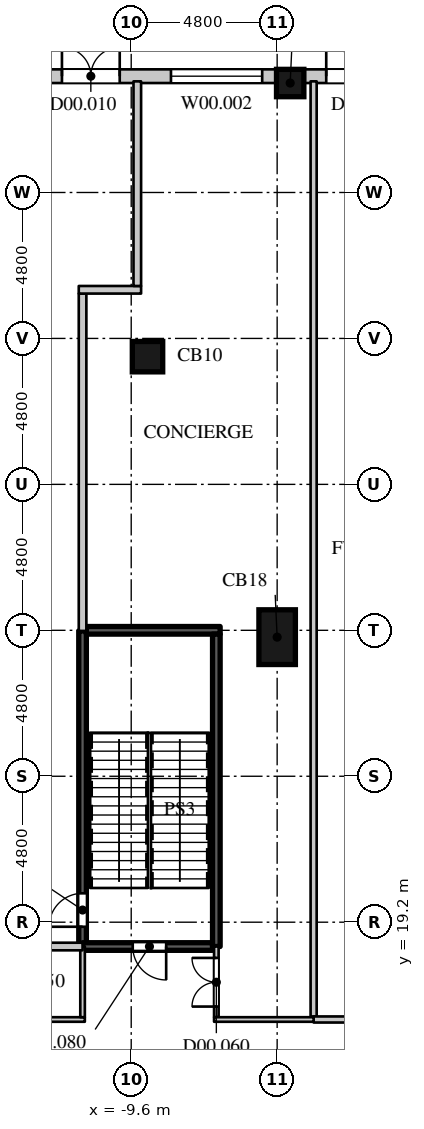
"""IFC4 building model, lengths in metres.
Left out: names, types, materials, properties, quantities, classifications, styles, units other than length and angle.
Written with IfcOpenShell. Run it as: python <this file> out.ifc"""

import sys

from ifc_helpers import new_model, si_unit, direction, frame, frame_2d, origin, origin_2d, place, context, subcontext, project, spatial, rectangle, extrude, element, fill, save


model = new_model("IFC4")
c1 = context("Model", 3, precision=1e-05, world=origin(), true_north=direction((0.0, 1.0)))
c2 = subcontext(c1, "Body", "Model", "MODEL_VIEW")
j1 = project(units=[si_unit("LENGTHUNIT", "METRE"), si_unit("PLANEANGLEUNIT", "RADIAN")], contexts=[c1])
p1 = place(None, origin())
s1 = spatial("IfcSite", under=j1, at=p1, CompositionType="ELEMENT")
p2 = place(p1, origin())
s2 = spatial("IfcBuilding", under=s1, at=p2, CompositionType="ELEMENT")
p3 = place(p2, origin())
s3 = spatial("IfcBuildingStorey", under=s2, at=p3, CompositionType="ELEMENT", Elevation=0.0)
p4 = place(p3, frame((-4.8, 28.575, 0.0), z_axis=(0.0, 0.0, 1.0), x_axis=(-1.0, 0.0, 0.0)))
e1 = element("IfcColumn", 1, at=p4, inside=s3, PredefinedType="COLUMN", context=c2, shape_type="SweptSolid", body=[
    extrude(rectangle(XDim=1.2, YDim=1.8, at=origin_2d()), origin(), (0.0, 0.0, 1.0), 6.0),
])
p5 = place(p3, frame((-9.064, 37.8, 0.0), z_axis=(0.0, 0.0, 1.0), x_axis=(1.0, 0.0, 0.0)))
e2 = element("IfcColumn", 2, at=p5, inside=s3, PredefinedType="COLUMN", context=c2, shape_type="SweptSolid", body=[
    extrude(rectangle(XDim=1.0, YDim=1.0, at=origin_2d()), origin(), (0.0, 0.0, 1.0), 6.0),
])
p6 = place(p3, frame((-4.371, 46.8, 0.0), z_axis=(0.0, 0.0, 1.0), x_axis=(1.0, 0.0, 0.0)))
e3 = element("IfcColumn", 3, at=p6, inside=s3, PredefinedType="COLUMN", context=c2, shape_type="SweptSolid", body=[
    extrude(rectangle(XDim=0.9, YDim=0.9, at=origin_2d()), origin(), (0.0, 0.0, 1.0), 6.0),
])
p7 = place(p3, frame((3.921, 47.025, 0.0), z_axis=(0.0, 0.0, 1.0), x_axis=(-1.0, 0.0, 0.0)))
e4 = element("IfcWall", 4, at=p7, inside=s3, PredefinedType="ELEMENTEDWALL", context=c2, shape_type="SweptSolid", body=[
    extrude(rectangle(XDim=7.842, YDim=0.45, at=frame_2d((3.921, 0.0))), origin(), (0.0, 0.0, 1.0), 4.8),
])
p8 = place(p7, frame((0.961, 0.0, 0.0)))
e5 = element("IfcOpeningElement", 5, at=p8, cuts=e4, PredefinedType="OPENING", context=c2, shape_type="SweptSolid", body=[
    extrude(rectangle(XDim=2.0, YDim=2.7, at=frame_2d((1.0, 1.35))), frame((0.0, 0.235, 0.0), z_axis=(0.0, -1.0, 0.0), x_axis=(1.0, 0.0, 0.0)), (0.0, 0.0, 1.0), 0.47),
])
p9 = place(p7, frame((5.107, 0.0, 0.0)))
e6 = element("IfcOpeningElement", 6, at=p9, cuts=e4, PredefinedType="OPENING", context=c2, shape_type="SweptSolid", body=[
    extrude(rectangle(XDim=2.0, YDim=2.7, at=frame_2d((1.0, 1.35))), frame((0.0, 0.235, 0.0), z_axis=(0.0, -1.0, 0.0), x_axis=(1.0, 0.0, 0.0)), (0.0, 0.0, 1.0), 0.47),
])
p10 = place(p3, frame((-4.821, 47.025, 0.0), z_axis=(0.0, 0.0, 1.0), x_axis=(-1.0, 0.0, 0.0)))
e7 = element("IfcWall", 7, at=p10, inside=s3, PredefinedType="ELEMENTEDWALL", context=c2, shape_type="SweptSolid", body=[
    extrude(rectangle(XDim=7.842, YDim=0.45, at=frame_2d((3.921, 0.0))), origin(), (0.0, 0.0, 1.0), 4.8),
])
p11 = place(p10, frame((0.471, 0.0, 1.05)))
e8 = element("IfcOpeningElement", 8, at=p11, cuts=e7, PredefinedType="OPENING", context=c2, shape_type="SweptSolid", body=[
    extrude(rectangle(XDim=3.0, YDim=2.7, at=frame_2d((1.5, 1.35))), frame((0.0, 0.235, 0.0), z_axis=(0.0, -1.0, 0.0), x_axis=(1.0, 0.0, 0.0)), (0.0, 0.0, 1.0), 0.47),
])
p12 = place(p10, frame((5.157, 0.0, 0.0)))
e9 = element("IfcOpeningElement", 9, at=p12, cuts=e7, PredefinedType="OPENING", context=c2, shape_type="SweptSolid", body=[
    extrude(rectangle(XDim=1.9, YDim=2.7, at=frame_2d((0.95, 1.35))), frame((0.0, 0.235, 0.0), z_axis=(0.0, -1.0, 0.0), x_axis=(1.0, 0.0, 0.0)), (0.0, 0.0, 1.0), 0.47),
])
p13 = place(p3, frame((-3.6, 16.1, 0.0), z_axis=(0.0, 0.0, 1.0), x_axis=(0.0, 1.0, 0.0)))
e10 = element("IfcWall", 10, at=p13, inside=s3, PredefinedType="PARTITIONING", context=c2, shape_type="SweptSolid", body=[
    extrude(rectangle(XDim=30.755, YDim=0.2, at=frame_2d((15.377, 0.0))), origin(), (0.0, 0.0, 1.0), 5.65),
])
p14 = place(p3, frame((-3.6, 16.0, 0.0), z_axis=(0.0, 0.0, 1.0), x_axis=(1.0, 0.0, 0.0)))
e11 = element("IfcWall", 11, at=p14, inside=s3, PredefinedType="PARTITIONING", context=c2, shape_type="SweptSolid", body=[
    extrude(rectangle(XDim=7.2, YDim=0.2, at=frame_2d((3.6, 0.0))), origin(), (0.0, 0.0, 1.0), 5.65),
])
p15 = place(p14, frame((2.85, 0.0, 0.0)))
e12 = element("IfcOpeningElement", 12, at=p15, cuts=e11, PredefinedType="OPENING", context=c2, shape_type="SweptSolid", body=[
    extrude(rectangle(XDim=1.5, YDim=2.2, at=frame_2d((0.75, 1.1))), frame((0.0, 0.11, 0.0), z_axis=(0.0, -1.0, 0.0), x_axis=(1.0, 0.0, 0.0)), (0.0, 0.0, 1.0), 0.22),
])
p16 = place(p3, frame((-20.075, 16.0, 0.0), z_axis=(0.0, 0.0, 1.0), x_axis=(1.0, 0.0, 0.0)))
e13 = element("IfcWall", 13, at=p16, inside=s3, PredefinedType="PARTITIONING", context=c2, shape_type="SweptSolid", body=[
    extrude(rectangle(XDim=8.95, YDim=0.15, at=frame_2d((4.475, 0.0))), origin(), (0.0, 0.0, 1.0), 5.65),
])
p17 = place(p16, frame((4.15, 0.0, 0.0)))
e14 = element("IfcOpeningElement", 14, at=p17, cuts=e13, PredefinedType="OPENING", context=c2, shape_type="SweptSolid", body=[
    extrude(rectangle(XDim=1.6, YDim=2.4, at=frame_2d((0.8, 1.2))), frame((0.0, 0.085, 0.0), z_axis=(0.0, -1.0, 0.0), x_axis=(1.0, 0.0, 0.0)), (0.0, 0.0, 1.0), 0.17),
])
p18 = place(p3, frame((-11.2, 16.075, 0.0), z_axis=(0.0, 0.0, 1.0), x_axis=(0.0, 1.0, 0.0)))
e15 = element("IfcWall", 15, at=p18, inside=s3, PredefinedType="PARTITIONING", context=c2, shape_type="SweptSolid", body=[
    extrude(rectangle(XDim=2.325, YDim=0.15, at=frame_2d((1.163, 0.0))), origin(), (0.0, 0.0, 1.0), 5.65),
])
p19 = place(p3, frame((-6.8, 16.075, 0.0), z_axis=(0.0, 0.0, 1.0), x_axis=(0.0, 1.0, 0.0)))
e16 = element("IfcWall", 16, at=p19, inside=s3, PredefinedType="PARTITIONING", context=c2, shape_type="SweptSolid", body=[
    extrude(rectangle(XDim=2.325, YDim=0.15, at=frame_2d((1.163, 0.0))), origin(), (0.0, 0.0, 1.0), 5.65),
])
p20 = place(p19, frame((0.35, 0.0, 0.0)))
e17 = element("IfcOpeningElement", 17, at=p20, cuts=e16, PredefinedType="OPENING", context=c2, shape_type="SweptSolid", body=[
    extrude(rectangle(XDim=1.6, YDim=2.4, at=frame_2d((0.8, 1.2))), frame((0.0, 0.085, 0.0), z_axis=(0.0, -1.0, 0.0), x_axis=(1.0, 0.0, 0.0)), (0.0, 0.0, 1.0), 0.17),
])
p21 = place(p3, frame((-6.875, 16.0, 0.0), z_axis=(0.0, 0.0, 1.0), x_axis=(1.0, 0.0, 0.0)))
e18 = element("IfcWall", 18, at=p21, inside=s3, PredefinedType="PARTITIONING", context=c2, shape_type="SweptSolid", body=[
    extrude(rectangle(XDim=3.275, YDim=0.15, at=frame_2d((1.637, 0.0))), origin(), (0.0, 0.0, 1.0), 5.65),
])
p22 = place(p3, frame((-11.2, 18.4, 0.0), z_axis=(0.0, 0.0, 1.0), x_axis=(0.0, 1.0, 0.0)))
e19 = element("IfcWall", 19, at=p22, inside=s3, PredefinedType="SHEAR", context=c2, shape_type="SweptSolid", body=[
    extrude(rectangle(XDim=10.38, YDim=0.25, at=frame_2d((5.19, 0.0))), origin(), (0.0, 0.0, 1.0), 5.65),
])
p23 = place(p22, frame((0.65, 0.0, 0.0)))
e20 = element("IfcOpeningElement", 20, at=p23, cuts=e19, PredefinedType="OPENING", context=c2, shape_type="SweptSolid", body=[
    extrude(rectangle(XDim=1.1, YDim=2.2, at=frame_2d((0.55, 1.1))), frame((0.0, 0.135, 0.0), z_axis=(0.0, -1.0, 0.0), x_axis=(1.0, 0.0, 0.0)), (0.0, 0.0, 1.0), 0.27),
])
p24 = place(p3, frame((-11.2, 18.4, 0.0), z_axis=(0.0, 0.0, 1.0), x_axis=(1.0, 0.0, 0.0)))
e21 = element("IfcWall", 21, at=p24, inside=s3, PredefinedType="SHEAR", context=c2, shape_type="SweptSolid", body=[
    extrude(rectangle(XDim=4.275, YDim=0.25, at=frame_2d((2.137, 0.0))), origin(), (0.0, 0.0, 1.0), 5.65),
])
p25 = place(p24, frame((1.65, 0.0, 0.0)))
e22 = element("IfcOpeningElement", 22, at=p25, cuts=e21, PredefinedType="OPENING", context=c2, shape_type="SweptSolid", body=[
    extrude(rectangle(XDim=1.1, YDim=2.2, at=frame_2d((0.55, 1.1))), frame((0.0, 0.135, 0.0), z_axis=(0.0, -1.0, 0.0), x_axis=(1.0, 0.0, 0.0)), (0.0, 0.0, 1.0), 0.27),
])
p26 = place(p3, frame((-11.075, 28.8, 0.0), z_axis=(0.0, 0.0, 1.0), x_axis=(1.0, 0.0, 0.0)))
e23 = element("IfcWall", 23, at=p26, inside=s3, PredefinedType="SHEAR", context=c2, shape_type="SweptSolid", body=[
    extrude(rectangle(XDim=4.4, YDim=0.25, at=frame_2d((2.2, 0.0))), origin(), (0.0, 0.0, 1.0), 5.65),
])
p27 = place(p3, frame((-6.8, 18.4, 0.0), z_axis=(0.0, 0.0, 1.0), x_axis=(0.0, 1.0, 0.0)))
e24 = element("IfcWall", 24, at=p27, inside=s3, PredefinedType="SHEAR", context=c2, shape_type="SweptSolid", body=[
    extrude(rectangle(XDim=10.275, YDim=0.25, at=frame_2d((5.138, 0.0))), origin(), (0.0, 0.0, 1.0), 5.65),
])
p28 = place(p3, frame((-13.225, 18.4, 0.0), z_axis=(0.0, 0.0, 1.0), x_axis=(1.0, 0.0, 0.0)))
e25 = element("IfcWall", 25, at=p28, inside=s3, PredefinedType="PARTITIONING", context=c2, shape_type="SweptSolid", body=[
    extrude(rectangle(XDim=2.025, YDim=0.25, at=frame_2d((1.013, 0.0))), origin(), (0.0, 0.0, 1.0), 5.65),
])
p29 = place(p3, frame((-11.2, 28.78, 0.0), z_axis=(0.0, 0.0, 1.0), x_axis=(0.0, 1.0, 0.0)))
e26 = element("IfcWall", 26, at=p29, inside=s3, PredefinedType="PARTITIONING", context=c2, shape_type="SweptSolid", body=[
    extrude(rectangle(XDim=11.095, YDim=0.25, at=frame_2d((5.547, 0.0))), origin(), (0.0, 0.0, 1.0), 5.65),
])
p30 = place(p3, frame((-11.325, 40.0, 0.0), z_axis=(0.0, 0.0, 1.0), x_axis=(1.0, 0.0, 0.0)))
e27 = element("IfcWall", 27, at=p30, inside=s3, PredefinedType="PARTITIONING", context=c2, shape_type="SweptSolid", body=[
    extrude(rectangle(XDim=2.05, YDim=0.25, at=frame_2d((1.025, 0.0))), origin(), (0.0, 0.0, 1.0), 5.65),
])
p31 = place(p3, frame((-9.4, 40.125, 0.0), z_axis=(0.0, 0.0, 1.0), x_axis=(0.0, 1.0, 0.0)))
e28 = element("IfcWall", 28, at=p31, inside=s3, PredefinedType="PARTITIONING", context=c2, shape_type="SweptSolid", body=[
    extrude(rectangle(XDim=6.73, YDim=0.25, at=frame_2d((3.365, 0.0))), origin(), (0.0, 0.0, 1.0), 5.65),
])
p32 = place(p9, frame((2.0, 0.0, 0.0), z_axis=(0.0, 0.0, 1.0), x_axis=(-1.0, 0.0, 0.0)))
e29 = element("IfcDoor", 29, at=p32, inside=s3, OperationType="DOUBLE_DOOR_SINGLE_SWING", PredefinedType="DOOR", context=c2, shape_type="SweptSolid", body=[
    extrude(rectangle(XDim=2.0, YDim=2.7, at=frame_2d((1.0, 1.35))), frame((0.0, -0.08, 0.0), z_axis=(0.0, -1.0, 0.0), x_axis=(1.0, 0.0, 0.0)), (0.0, 0.0, 1.0), 0.05),
])
fill(e6, e29)
p33 = place(p11, origin())
e30 = element("IfcWindow", 30, at=p33, inside=s3, PartitioningType="SINGLE_PANEL", PredefinedType="WINDOW", context=c2, shape_type="SweptSolid", body=[
    extrude(rectangle(XDim=3.0, YDim=2.7, at=frame_2d((1.5, 1.35))), frame((0.0, 0.135, 0.0), z_axis=(0.0, -1.0, 0.0), x_axis=(1.0, 0.0, 0.0)), (0.0, 0.0, 1.0), 0.06),
])
fill(e8, e30)
p34 = place(p12, frame((1.9, 0.0, 0.0), z_axis=(0.0, 0.0, 1.0), x_axis=(-1.0, 0.0, 0.0)))
e31 = element("IfcDoor", 31, at=p34, inside=s3, OperationType="DOUBLE_DOOR_SINGLE_SWING", PredefinedType="DOOR", context=c2, shape_type="SweptSolid", body=[
    extrude(rectangle(XDim=1.9, YDim=2.7, at=frame_2d((0.95, 1.35))), frame((0.0, -0.08, 0.0), z_axis=(0.0, -1.0, 0.0), x_axis=(1.0, 0.0, 0.0)), (0.0, 0.0, 1.0), 0.05),
])
fill(e9, e31)
p35 = place(p20, origin())
e32 = element("IfcDoor", 32, at=p35, inside=s3, OperationType="DOUBLE_DOOR_SINGLE_SWING", PredefinedType="DOOR", context=c2, shape_type="SweptSolid", body=[
    extrude(rectangle(XDim=1.6, YDim=2.4, at=frame_2d((0.8, 1.2))), frame((0.0, 0.025, 0.0), z_axis=(0.0, -1.0, 0.0), x_axis=(1.0, 0.0, 0.0)), (0.0, 0.0, 1.0), 0.05),
])
fill(e17, e32)
p36 = place(p25, origin())
e33 = element("IfcDoor", 33, at=p36, inside=s3, OperationType="SINGLE_SWING_LEFT", PredefinedType="DOOR", context=c2, shape_type="SweptSolid", body=[
    extrude(rectangle(XDim=1.1, YDim=2.2, at=frame_2d((0.55, 1.1))), frame((0.0, 0.025, 0.0), z_axis=(0.0, -1.0, 0.0), x_axis=(1.0, 0.0, 0.0)), (0.0, 0.0, 1.0), 0.05),
])
fill(e22, e33)
p37 = place(p23, origin())
e34 = element("IfcDoor", 34, at=p37, inside=s3, OperationType="SINGLE_SWING_LEFT", PredefinedType="DOOR", context=c2, shape_type="SweptSolid", body=[
    extrude(rectangle(XDim=1.1, YDim=2.2, at=frame_2d((0.55, 1.1))), frame((0.0, 0.025, 0.0), z_axis=(0.0, -1.0, 0.0), x_axis=(1.0, 0.0, 0.0)), (0.0, 0.0, 1.0), 0.05),
])
fill(e20, e34)
save(model, sys.argv[1])
